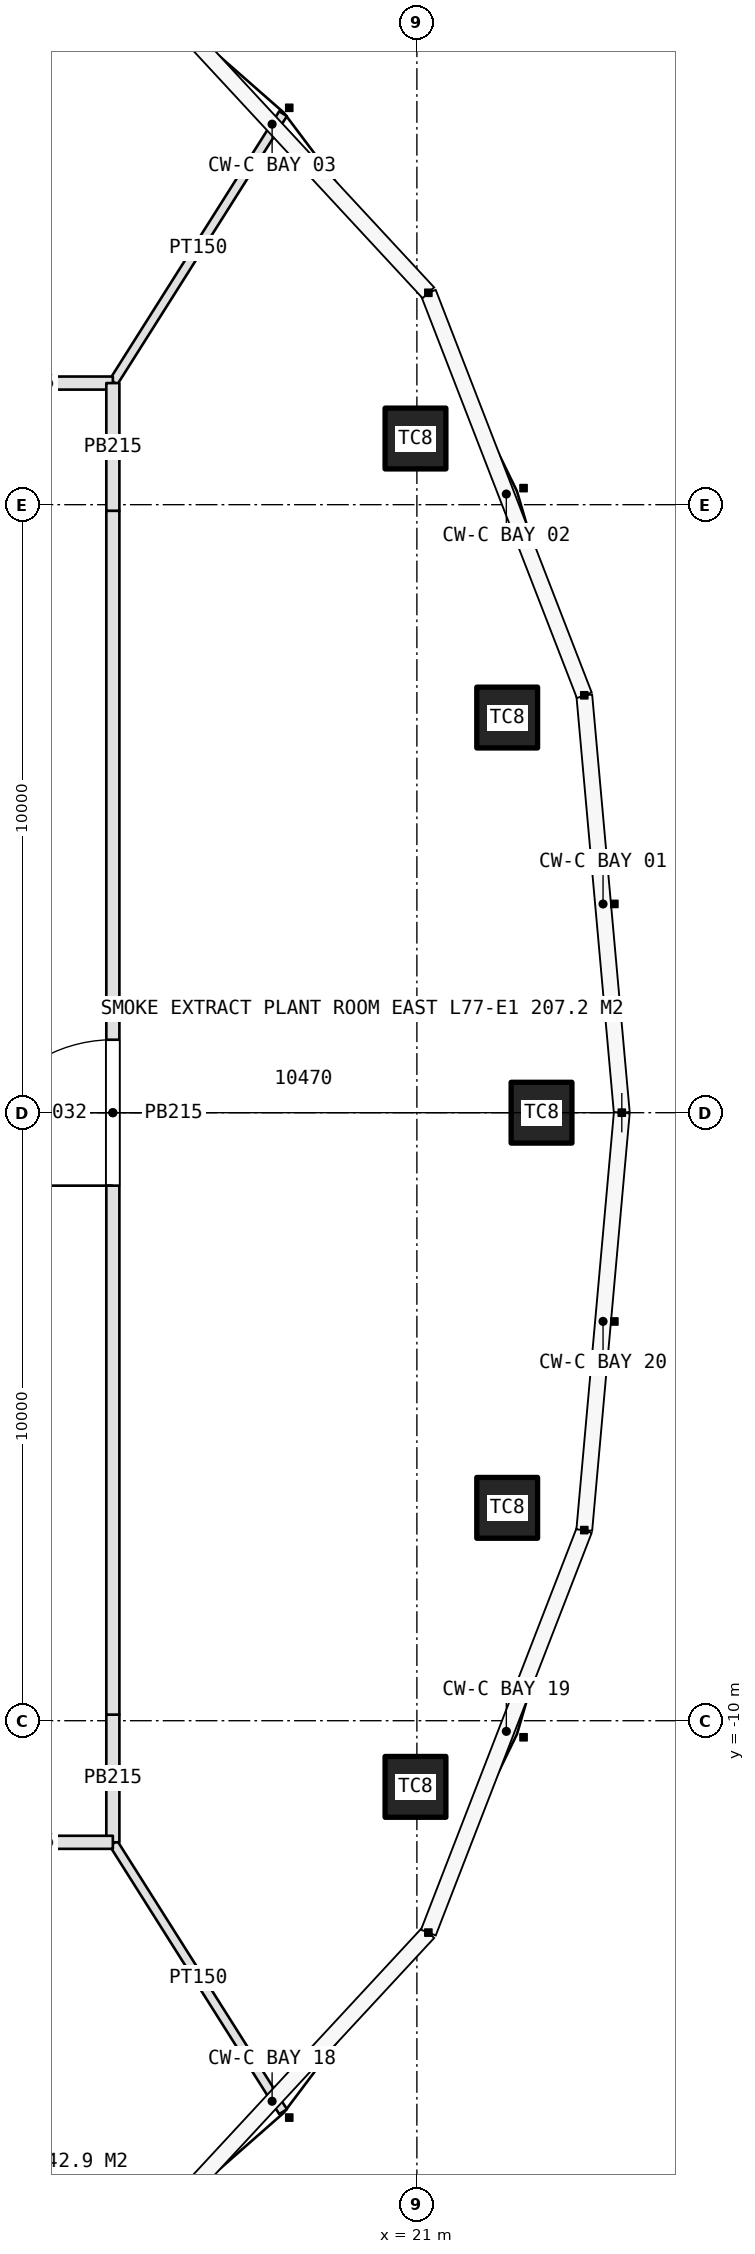
"""IFC4 building model, lengths in metres.
Left out: names, types, materials, properties, quantities, classifications, styles, units other than length and angle.
Written with IfcOpenShell. Run it as: python <this file> out.ifc"""

import sys

from ifc_helpers import new_model, si_unit, direction, frame, frame_2d, origin, origin_2d, place, context, subcontext, project, spatial, rectangle, extrude, element, fill, save


model = new_model("IFC4")
c1 = context("Model", 3, precision=1e-05, world=origin(), true_north=direction((0.0, 1.0)))
c2 = subcontext(c1, "Body", "Model", "MODEL_VIEW")
j1 = project(units=[si_unit("LENGTHUNIT", "METRE"), si_unit("PLANEANGLEUNIT", "RADIAN")], contexts=[c1])
p1 = place(None, origin())
s1 = spatial("IfcSite", under=j1, at=p1, CompositionType="ELEMENT")
p2 = place(p1, origin())
s2 = spatial("IfcBuilding", under=s1, at=p2, CompositionType="ELEMENT")
p3 = place(p2, frame((0.0, 0.0, 344.2)))
s3 = spatial("IfcBuildingStorey", under=s2, at=p3, CompositionType="ELEMENT", Elevation=344.2)
for number, where, z_axis, x_axis in (
    (1, (23.05, 0.0, 0.0), (0.0, 0.0, 1.0), (1.0, 0.0, 0.0)),
    (2, (22.485, 6.499, 0.0), (0.0, 0.0, 1.0), (1.0, 0.0, 0.0)),
    (3, (20.977, 11.088, 0.0), (0.0, 0.0, 1.0), (1.0, 0.0, 0.0)),
    (4, (20.977, -11.088, 0.0), (0.0, 0.0, 1.0), (1.0, 0.0, 0.0)),
    (5, (22.485, -6.499, 0.0), (0.0, 0.0, 1.0), (1.0, 0.0, 0.0)),
):
    element("IfcColumn", number, at=place(p3, frame(where, z_axis=z_axis, x_axis=x_axis)), inside=s3, PredefinedType="COLUMN", context=c2, shape_type="SweptSolid", body=[
        extrude(rectangle(XDim=1.0, YDim=1.0, at=origin_2d()), origin(), (0.0, 0.0, 1.0), 5.0),
    ])
for number, where, z_axis, x_axis in (
    (6, (16.011, -12.017, 0.0), (0.0, 0.0, 1.0), (0.534, -0.845, 0.0)),
    (7, (16.011, 12.017, 0.0), (0.0, 0.0, 1.0), (0.534, 0.845, 0.0)),
):
    element("IfcWall", number, at=place(p3, frame(where, z_axis=z_axis, x_axis=x_axis)), inside=s3, PredefinedType="PARTITIONING", context=c2, shape_type="SweptSolid", body=[
        extrude(rectangle(XDim=5.22, YDim=0.15, at=frame_2d((2.61, 0.0))), origin(), (0.0, 0.0, 1.0), 4.2),
    ])
for number, where, z_axis, x_axis in (
    (8, (16.0, 12.0, 0.0), (0.0, 0.0, 1.0), (-1.0, 0.0, 0.0)),
    (9, (16.0, -12.0, 0.0), (0.0, 0.0, 1.0), (0.0, 1.0, 0.0)),
):
    element("IfcWall", number, at=place(p3, frame(where, z_axis=z_axis, x_axis=x_axis)), inside=s3, PredefinedType="PARTITIONING", context=c2, shape_type="SweptSolid", body=[
        extrude(rectangle(XDim=2.1, YDim=0.215, at=frame_2d((1.05, 0.0))), origin(), (0.0, 0.0, 1.0), 4.2),
    ])
p4 = place(p3, frame((16.0, -9.9, 0.0), z_axis=(0.0, 0.0, 1.0), x_axis=(0.0, 1.0, 0.0)))
e10 = element("IfcWall", 10, at=p4, inside=s3, PredefinedType="PARTITIONING", context=c2, shape_type="SweptSolid", body=[
    extrude(rectangle(XDim=19.8, YDim=0.215, at=frame_2d((9.9, 0.0))), origin(), (0.0, 0.0, 1.0), 4.2),
])
p5 = place(p4, frame((8.7, 0.0, 0.0)))
e11 = element("IfcOpeningElement", 11, at=p5, cuts=e10, PredefinedType="OPENING", context=c2, shape_type="SweptSolid", body=[
    extrude(rectangle(XDim=2.4, YDim=2.4, at=frame_2d((1.2, 1.2))), frame((0.0, 0.118, 0.0), z_axis=(0.0, -1.0, 0.0), x_axis=(1.0, 0.0, 0.0)), (0.0, 0.0, 1.0), 0.235),
])
for number, where, z_axis, x_axis in (
    (12, (16.0, 9.9, 0.0), (0.0, 0.0, 1.0), (0.0, 1.0, 0.0)),
    (13, (13.9, -12.0, 0.0), (0.0, 0.0, 1.0), (1.0, 0.0, 0.0)),
):
    element("IfcWall", number, at=place(p3, frame(where, z_axis=z_axis, x_axis=x_axis)), inside=s3, PredefinedType="PARTITIONING", context=c2, shape_type="SweptSolid", body=[
        extrude(rectangle(XDim=2.1, YDim=0.215, at=frame_2d((1.05, 0.0))), origin(), (0.0, 0.0, 1.0), 4.2),
    ])
p6 = place(p5, origin())
e14 = element("IfcDoor", 14, at=p6, inside=s3, OperationType="DOUBLE_DOOR_SINGLE_SWING", PredefinedType="DOOR", context=c2, shape_type="SweptSolid", body=[
    extrude(rectangle(XDim=2.4, YDim=2.4, at=frame_2d((1.2, 1.2))), frame((0.0, 0.025, 0.0), z_axis=(0.0, -1.0, 0.0), x_axis=(1.0, 0.0, 0.0)), (0.0, 0.0, 1.0), 0.05),
])
fill(e11, e14)
save(model, sys.argv[1])
